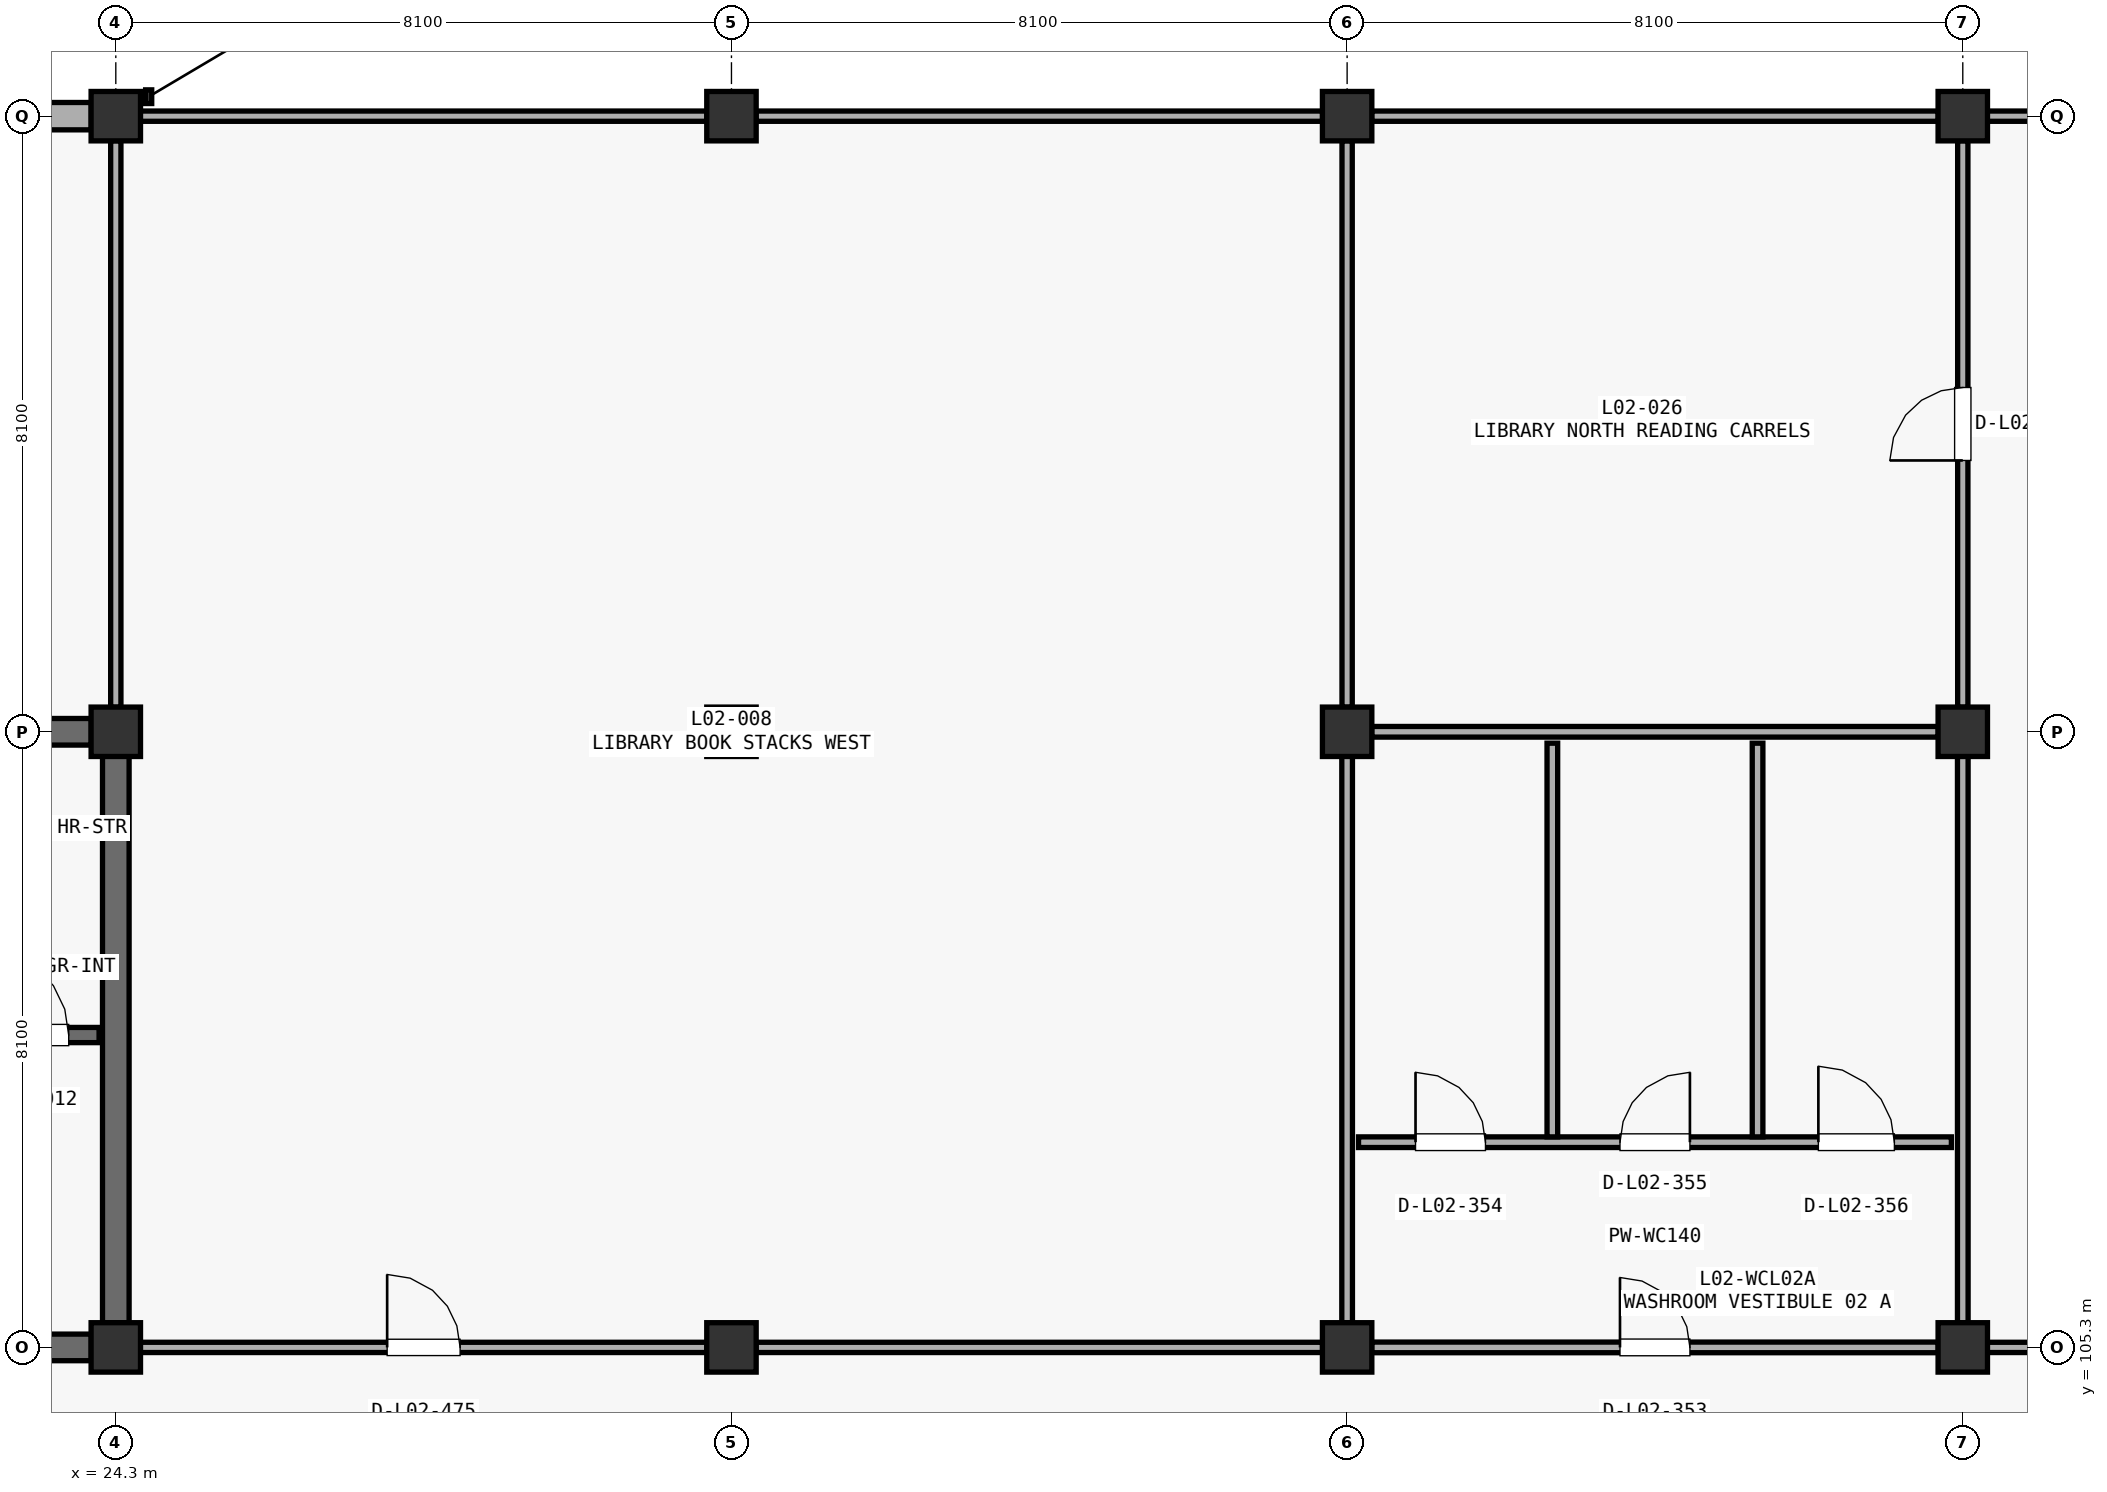
"""IFC4 building model, lengths in metres.
Left out: names, types, materials, properties, quantities, classifications, styles, units other than length and angle.
Written with IfcOpenShell. Run it as: python <this file> out.ifc"""

import sys

from ifc_helpers import new_model, si_unit, direction, frame, frame_2d, origin, origin_2d, place, context, subcontext, project, spatial, rectangle, extrude, element, fill, save


model = new_model("IFC4")
c1 = context("Model", 3, precision=1e-05, world=origin(), true_north=direction((0.0, 1.0)))
c2 = subcontext(c1, "Body", "Model", "MODEL_VIEW")
j1 = project(units=[si_unit("LENGTHUNIT", "METRE"), si_unit("PLANEANGLEUNIT", "RADIAN")], contexts=[c1])
p1 = place(None, origin())
s1 = spatial("IfcSite", under=j1, at=p1, CompositionType="ELEMENT")
p2 = place(p1, origin())
s2 = spatial("IfcBuilding", under=s1, at=p2, CompositionType="ELEMENT")
p3 = place(p2, frame((0.0, 0.0, 9.69)))
s3 = spatial("IfcBuildingStorey", under=s2, at=p3, CompositionType="ELEMENT", Elevation=9.69)
for number, where, z_axis, x_axis in (
    (1, (24.3, 105.3, 0.0), (0.0, 0.0, 1.0), (1.0, 0.0, 0.0)),
    (2, (24.3, 113.4, 0.0), (0.0, 0.0, 1.0), (1.0, 0.0, 0.0)),
    (3, (24.3, 121.5, 0.0), (0.0, 0.0, 1.0), (1.0, 0.0, 0.0)),
    (4, (32.4, 105.3, 0.0), (0.0, 0.0, 1.0), (1.0, 0.0, 0.0)),
    (5, (32.4, 113.4, 0.0), (0.0, 0.0, 1.0), (1.0, 0.0, 0.0)),
    (6, (32.4, 121.5, 0.0), (0.0, 0.0, 1.0), (1.0, 0.0, 0.0)),
    (7, (40.5, 105.3, 0.0), (0.0, 0.0, 1.0), (1.0, 0.0, 0.0)),
    (8, (40.5, 113.4, 0.0), (0.0, 0.0, 1.0), (1.0, 0.0, 0.0)),
    (9, (40.5, 121.5, 0.0), (0.0, 0.0, 1.0), (1.0, 0.0, 0.0)),
    (10, (48.6, 105.3, 0.0), (0.0, 0.0, 1.0), (1.0, 0.0, 0.0)),
    (11, (48.6, 113.4, 0.0), (0.0, 0.0, 1.0), (1.0, 0.0, 0.0)),
    (12, (48.6, 121.5, 0.0), (0.0, 0.0, 1.0), (1.0, 0.0, 0.0)),
):
    element("IfcColumn", number, at=place(p3, frame(where, z_axis=z_axis, x_axis=x_axis)), inside=s3, PredefinedType="COLUMN", context=c2, shape_type="SweptSolid", body=[
        extrude(rectangle(XDim=0.65, YDim=0.65, at=origin_2d()), origin(), (0.0, 0.0, 1.0), 4.42),
    ])
p4 = place(p3, frame((16.523, 121.5, 0.0), z_axis=(0.0, 0.0, 1.0), x_axis=(1.0, 0.0, 0.0)))
e13 = element("IfcWall", 13, at=p4, inside=s3, PredefinedType="STANDARD", context=c2, shape_type="SweptSolid", body=[
    extrude(rectangle(XDim=7.454, YDim=0.36, at=frame_2d((3.727, 0.0))), origin(), (0.0, 0.0, 1.0), 3.332),
])
p5 = place(p4, frame((2.877, 0.0, 0.85)))
e14 = element("IfcOpeningElement", 14, at=p5, cuts=e13, PredefinedType="OPENING", context=c2, shape_type="SweptSolid", body=[
    extrude(rectangle(XDim=1.7, YDim=1.7, at=frame_2d((0.85, 0.85))), frame((0.0, 0.19, 0.0), z_axis=(0.0, -1.0, 0.0), x_axis=(1.0, 0.0, 0.0)), (0.0, 0.0, 1.0), 0.38),
])
p6 = place(p3, frame((16.523, 113.4, 0.0), z_axis=(0.0, 0.0, 1.0), x_axis=(1.0, 0.0, 0.0)))
e15 = element("IfcWall", 15, at=p6, inside=s3, PredefinedType="SHEAR", context=c2, shape_type="SweptSolid", body=[
    extrude(rectangle(XDim=7.454, YDim=0.35, at=frame_2d((3.727, 0.0))), origin(), (0.0, 0.0, 1.0), 4.082),
])
p7 = place(p3, frame((24.3, 105.623, 0.0), z_axis=(0.0, 0.0, 1.0), x_axis=(0.0, 1.0, 0.0)))
e16 = element("IfcWall", 16, at=p7, inside=s3, PredefinedType="SHEAR", context=c2, shape_type="SweptSolid", body=[
    extrude(rectangle(XDim=7.454, YDim=0.35, at=frame_2d((3.727, 0.0))), origin(), (0.0, 0.0, 1.0), 4.082),
])
p8 = place(p3, frame((16.523, 105.3, 0.0), z_axis=(0.0, 0.0, 1.0), x_axis=(1.0, 0.0, 0.0)))
e17 = element("IfcWall", 17, at=p8, inside=s3, PredefinedType="SHEAR", context=c2, shape_type="SweptSolid", body=[
    extrude(rectangle(XDim=7.454, YDim=0.35, at=frame_2d((3.727, 0.0))), origin(), (0.0, 0.0, 1.0), 4.082),
])
p9 = place(p8, frame((5.204, 0.0, 0.0)))
e18 = element("IfcOpeningElement", 18, at=p9, cuts=e17, PredefinedType="OPENING", context=c2, shape_type="SweptSolid", body=[
    extrude(rectangle(XDim=1.2, YDim=2.2, at=frame_2d((0.6, 1.1))), frame((0.0, 0.185, 0.0), z_axis=(0.0, -1.0, 0.0), x_axis=(1.0, 0.0, 0.0)), (0.0, 0.0, 1.0), 0.37),
])
p10 = place(p3, frame((16.42, 109.41, 0.0), z_axis=(0.0, 0.0, 1.0), x_axis=(1.0, 0.0, 0.0)))
e19 = element("IfcWall", 19, at=p10, inside=s3, PredefinedType="SHEAR", context=c2, shape_type="SweptSolid", body=[
    extrude(rectangle(XDim=7.66, YDim=0.2, at=frame_2d((3.83, 0.0))), origin(), (0.0, 0.0, 1.0), 4.082),
])
p11 = place(p10, frame((6.11, 0.0, 0.0)))
e20 = element("IfcOpeningElement", 20, at=p11, cuts=e19, PredefinedType="OPENING", context=c2, shape_type="SweptSolid", body=[
    extrude(rectangle(XDim=1.15, YDim=2.2, at=frame_2d((0.575, 1.1))), frame((0.0, 0.11, 0.0), z_axis=(0.0, -1.0, 0.0), x_axis=(1.0, 0.0, 0.0)), (0.0, 0.0, 1.0), 0.22),
])
p12 = place(p3, frame((40.823, 105.3, 0.0), z_axis=(0.0, 0.0, 1.0), x_axis=(1.0, 0.0, 0.0)))
e21 = element("IfcWall", 21, at=p12, inside=s3, PredefinedType="PARTITIONING", context=c2, shape_type="SweptSolid", body=[
    extrude(rectangle(XDim=7.454, YDim=0.14, at=frame_2d((3.727, 0.0))), origin(), (0.0, 0.0, 1.0), 3.43),
])
p13 = place(p12, frame((3.267, 0.0, 0.0)))
e22 = element("IfcOpeningElement", 22, at=p13, cuts=e21, PredefinedType="OPENING", context=c2, shape_type="SweptSolid", body=[
    extrude(rectangle(XDim=0.92, YDim=2.15, at=frame_2d((0.46, 1.075))), frame((0.0, 0.08, 0.0), z_axis=(0.0, -1.0, 0.0), x_axis=(1.0, 0.0, 0.0)), (0.0, 0.0, 1.0), 0.16),
])
p14 = place(p3, frame((40.823, 113.4, 0.0), z_axis=(0.0, 0.0, 1.0), x_axis=(1.0, 0.0, 0.0)))
e23 = element("IfcWall", 23, at=p14, inside=s3, PredefinedType="PARTITIONING", context=c2, shape_type="SweptSolid", body=[
    extrude(rectangle(XDim=7.454, YDim=0.14, at=frame_2d((3.727, 0.0))), origin(), (0.0, 0.0, 1.0), 3.48),
])
p15 = place(p3, frame((40.5, 105.623, 0.0), z_axis=(0.0, 0.0, 1.0), x_axis=(0.0, 1.0, 0.0)))
e24 = element("IfcWall", 24, at=p15, inside=s3, PredefinedType="PARTITIONING", context=c2, shape_type="SweptSolid", body=[
    extrude(rectangle(XDim=7.454, YDim=0.14, at=frame_2d((3.727, 0.0))), origin(), (0.0, 0.0, 1.0), 3.43),
])
p16 = place(p3, frame((48.6, 105.623, 0.0), z_axis=(0.0, 0.0, 1.0), x_axis=(0.0, 1.0, 0.0)))
e25 = element("IfcWall", 25, at=p16, inside=s3, PredefinedType="PARTITIONING", context=c2, shape_type="SweptSolid", body=[
    extrude(rectangle(XDim=7.454, YDim=0.14, at=frame_2d((3.727, 0.0))), origin(), (0.0, 0.0, 1.0), 3.23),
])
p17 = place(p3, frame((40.65, 108.0, 0.0), z_axis=(0.0, 0.0, 1.0), x_axis=(1.0, 0.0, 0.0)))
e26 = element("IfcWall", 26, at=p17, inside=s3, PredefinedType="PARTITIONING", context=c2, shape_type="SweptSolid", body=[
    extrude(rectangle(XDim=7.8, YDim=0.14, at=frame_2d((3.9, 0.0))), origin(), (0.0, 0.0, 1.0), 4.082),
])
p18 = place(p17, frame((0.75, 0.0, 0.0)))
e27 = element("IfcOpeningElement", 27, at=p18, cuts=e26, PredefinedType="OPENING", context=c2, shape_type="SweptSolid", body=[
    extrude(rectangle(XDim=0.92, YDim=2.15, at=frame_2d((0.46, 1.075))), frame((0.0, 0.08, 0.0), z_axis=(0.0, -1.0, 0.0), x_axis=(1.0, 0.0, 0.0)), (0.0, 0.0, 1.0), 0.16),
])
p19 = place(p17, frame((3.44, 0.0, 0.0)))
e28 = element("IfcOpeningElement", 28, at=p19, cuts=e26, PredefinedType="OPENING", context=c2, shape_type="SweptSolid", body=[
    extrude(rectangle(XDim=0.92, YDim=2.15, at=frame_2d((0.46, 1.075))), frame((0.0, 0.08, 0.0), z_axis=(0.0, -1.0, 0.0), x_axis=(1.0, 0.0, 0.0)), (0.0, 0.0, 1.0), 0.16),
])
p20 = place(p17, frame((6.05, 0.0, 0.0)))
e29 = element("IfcOpeningElement", 29, at=p20, cuts=e26, PredefinedType="OPENING", context=c2, shape_type="SweptSolid", body=[
    extrude(rectangle(XDim=1.0, YDim=2.15, at=frame_2d((0.5, 1.075))), frame((0.0, 0.08, 0.0), z_axis=(0.0, -1.0, 0.0), x_axis=(1.0, 0.0, 0.0)), (0.0, 0.0, 1.0), 0.16),
])
for number, where, z_axis, x_axis in (
    (30, (43.2, 108.07, 0.0), (0.0, 0.0, 1.0), (0.0, 1.0, 0.0)),
    (31, (45.9, 108.07, 0.0), (0.0, 0.0, 1.0), (0.0, 1.0, 0.0)),
):
    element("IfcWall", number, at=place(p3, frame(where, z_axis=z_axis, x_axis=x_axis)), inside=s3, PredefinedType="PARTITIONING", context=c2, shape_type="SweptSolid", body=[
        extrude(rectangle(XDim=5.18, YDim=0.14, at=frame_2d((2.59, 0.0))), origin(), (0.0, 0.0, 1.0), 4.082),
    ])
p21 = place(p3, frame((24.623, 105.3, 0.0), z_axis=(0.0, 0.0, 1.0), x_axis=(1.0, 0.0, 0.0)))
e32 = element("IfcWall", 32, at=p21, inside=s3, PredefinedType="PARTITIONING", context=c2, shape_type="SweptSolid", body=[
    extrude(rectangle(XDim=7.454, YDim=0.135, at=frame_2d((3.727, 0.0))), origin(), (0.0, 0.0, 1.0), 3.132),
])
p22 = place(p21, frame((3.247, 0.0, 0.0)))
e33 = element("IfcOpeningElement", 33, at=p22, cuts=e32, PredefinedType="OPENING", context=c2, shape_type="SweptSolid", body=[
    extrude(rectangle(XDim=0.96, YDim=2.15, at=frame_2d((0.48, 1.075))), frame((0.0, 0.078, 0.0), z_axis=(0.0, -1.0, 0.0), x_axis=(1.0, 0.0, 0.0)), (0.0, 0.0, 1.0), 0.155),
])
p23 = place(p3, frame((32.723, 105.3, 0.0), z_axis=(0.0, 0.0, 1.0), x_axis=(1.0, 0.0, 0.0)))
e34 = element("IfcWall", 34, at=p23, inside=s3, PredefinedType="PARTITIONING", context=c2, shape_type="SweptSolid", body=[
    extrude(rectangle(XDim=7.454, YDim=0.135, at=frame_2d((3.727, 0.0))), origin(), (0.0, 0.0, 1.0), 3.332),
])
p24 = place(p3, frame((40.5, 113.723, 0.0), z_axis=(0.0, 0.0, 1.0), x_axis=(0.0, 1.0, 0.0)))
e35 = element("IfcWall", 35, at=p24, inside=s3, PredefinedType="PARTITIONING", context=c2, shape_type="SweptSolid", body=[
    extrude(rectangle(XDim=7.454, YDim=0.135, at=frame_2d((3.727, 0.0))), origin(), (0.0, 0.0, 1.0), 3.482),
])
p25 = place(p3, frame((24.3, 113.723, 0.0), z_axis=(0.0, 0.0, 1.0), x_axis=(0.0, 1.0, 0.0)))
e36 = element("IfcWall", 36, at=p25, inside=s3, PredefinedType="PARTITIONING", context=c2, shape_type="SweptSolid", body=[
    extrude(rectangle(XDim=7.454, YDim=0.135, at=frame_2d((3.727, 0.0))), origin(), (0.0, 0.0, 1.0), 3.232),
])
p26 = place(p3, frame((24.623, 121.5, 0.0), z_axis=(0.0, 0.0, 1.0), x_axis=(1.0, 0.0, 0.0)))
e37 = element("IfcWall", 37, at=p26, inside=s3, PredefinedType="PARTITIONING", context=c2, shape_type="SweptSolid", body=[
    extrude(rectangle(XDim=7.454, YDim=0.135, at=frame_2d((3.727, 0.0))), origin(), (0.0, 0.0, 1.0), 3.667),
])
p27 = place(p3, frame((32.723, 121.5, 0.0), z_axis=(0.0, 0.0, 1.0), x_axis=(1.0, 0.0, 0.0)))
e38 = element("IfcWall", 38, at=p27, inside=s3, PredefinedType="PARTITIONING", context=c2, shape_type="SweptSolid", body=[
    extrude(rectangle(XDim=7.454, YDim=0.135, at=frame_2d((3.727, 0.0))), origin(), (0.0, 0.0, 1.0), 3.482),
])
p28 = place(p3, frame((48.923, 105.3, 0.0), z_axis=(0.0, 0.0, 1.0), x_axis=(1.0, 0.0, 0.0)))
e39 = element("IfcWall", 39, at=p28, inside=s3, PredefinedType="PARTITIONING", context=c2, shape_type="SweptSolid", body=[
    extrude(rectangle(XDim=7.454, YDim=0.135, at=frame_2d((3.727, 0.0))), origin(), (0.0, 0.0, 1.0), 3.482),
])
p29 = place(p28, frame((3.247, 0.0, 0.0)))
e40 = element("IfcOpeningElement", 40, at=p29, cuts=e39, PredefinedType="OPENING", context=c2, shape_type="SweptSolid", body=[
    extrude(rectangle(XDim=0.96, YDim=2.15, at=frame_2d((0.48, 1.075))), frame((0.0, 0.078, 0.0), z_axis=(0.0, -1.0, 0.0), x_axis=(1.0, 0.0, 0.0)), (0.0, 0.0, 1.0), 0.155),
])
p30 = place(p3, frame((48.6, 113.723, 0.0), z_axis=(0.0, 0.0, 1.0), x_axis=(0.0, 1.0, 0.0)))
e41 = element("IfcWall", 41, at=p30, inside=s3, PredefinedType="PARTITIONING", context=c2, shape_type="SweptSolid", body=[
    extrude(rectangle(XDim=7.454, YDim=0.135, at=frame_2d((3.727, 0.0))), origin(), (0.0, 0.0, 1.0), 3.132),
])
p31 = place(p30, frame((3.247, 0.0, 0.0)))
e42 = element("IfcOpeningElement", 42, at=p31, cuts=e41, PredefinedType="OPENING", context=c2, shape_type="SweptSolid", body=[
    extrude(rectangle(XDim=0.96, YDim=2.15, at=frame_2d((0.48, 1.075))), frame((0.0, 0.078, 0.0), z_axis=(0.0, -1.0, 0.0), x_axis=(1.0, 0.0, 0.0)), (0.0, 0.0, 1.0), 0.155),
])
p32 = place(p3, frame((48.923, 121.5, 0.0), z_axis=(0.0, 0.0, 1.0), x_axis=(1.0, 0.0, 0.0)))
e43 = element("IfcWall", 43, at=p32, inside=s3, PredefinedType="PARTITIONING", context=c2, shape_type="SweptSolid", body=[
    extrude(rectangle(XDim=7.454, YDim=0.135, at=frame_2d((3.727, 0.0))), origin(), (0.0, 0.0, 1.0), 3.667),
])
p33 = place(p3, frame((40.823, 121.5, 0.0), z_axis=(0.0, 0.0, 1.0), x_axis=(1.0, 0.0, 0.0)))
e44 = element("IfcWall", 44, at=p33, inside=s3, PredefinedType="PARTITIONING", context=c2, shape_type="SweptSolid", body=[
    extrude(rectangle(XDim=7.454, YDim=0.135, at=frame_2d((3.727, 0.0))), origin(), (0.0, 0.0, 1.0), 3.232),
])
p34 = place(p11, origin())
e45 = element("IfcDoor", 45, at=p34, inside=s3, OperationType="SINGLE_SWING_LEFT", PredefinedType="DOOR", context=c2, shape_type="SweptSolid", body=[
    extrude(rectangle(XDim=1.15, YDim=2.2, at=frame_2d((0.575, 1.1))), frame((0.0, 0.025, 0.0), z_axis=(0.0, -1.0, 0.0), x_axis=(1.0, 0.0, 0.0)), (0.0, 0.0, 1.0), 0.05),
])
fill(e20, e45)
p35 = place(p13, origin())
e46 = element("IfcDoor", 46, at=p35, inside=s3, OperationType="SINGLE_SWING_LEFT", PredefinedType="DOOR", context=c2, shape_type="SweptSolid", body=[
    extrude(rectangle(XDim=0.92, YDim=2.15, at=frame_2d((0.46, 1.075))), frame((0.0, 0.025, 0.0), z_axis=(0.0, -1.0, 0.0), x_axis=(1.0, 0.0, 0.0)), (0.0, 0.0, 1.0), 0.05),
])
fill(e22, e46)
p36 = place(p18, origin())
e47 = element("IfcDoor", 47, at=p36, inside=s3, OperationType="SINGLE_SWING_LEFT", PredefinedType="DOOR", context=c2, shape_type="SweptSolid", body=[
    extrude(rectangle(XDim=0.92, YDim=2.15, at=frame_2d((0.46, 1.075))), frame((0.0, 0.025, 0.0), z_axis=(0.0, -1.0, 0.0), x_axis=(1.0, 0.0, 0.0)), (0.0, 0.0, 1.0), 0.05),
])
fill(e27, e47)
p37 = place(p19, origin())
e48 = element("IfcDoor", 48, at=p37, inside=s3, OperationType="SINGLE_SWING_RIGHT", PredefinedType="DOOR", context=c2, shape_type="SweptSolid", body=[
    extrude(rectangle(XDim=0.92, YDim=2.15, at=frame_2d((0.46, 1.075))), frame((0.0, 0.025, 0.0), z_axis=(0.0, -1.0, 0.0), x_axis=(1.0, 0.0, 0.0)), (0.0, 0.0, 1.0), 0.05),
])
fill(e28, e48)
p38 = place(p20, origin())
e49 = element("IfcDoor", 49, at=p38, inside=s3, OperationType="SINGLE_SWING_LEFT", PredefinedType="DOOR", context=c2, shape_type="SweptSolid", body=[
    extrude(rectangle(XDim=1.0, YDim=2.15, at=frame_2d((0.5, 1.075))), frame((0.0, 0.025, 0.0), z_axis=(0.0, -1.0, 0.0), x_axis=(1.0, 0.0, 0.0)), (0.0, 0.0, 1.0), 0.05),
])
fill(e29, e49)
p39 = place(p22, origin())
e50 = element("IfcDoor", 50, at=p39, inside=s3, OperationType="SINGLE_SWING_LEFT", PredefinedType="DOOR", context=c2, shape_type="SweptSolid", body=[
    extrude(rectangle(XDim=0.96, YDim=2.15, at=frame_2d((0.48, 1.075))), frame((0.0, 0.025, 0.0), z_axis=(0.0, -1.0, 0.0), x_axis=(1.0, 0.0, 0.0)), (0.0, 0.0, 1.0), 0.05),
])
fill(e33, e50)
p40 = place(p31, origin())
e51 = element("IfcDoor", 51, at=p40, inside=s3, OperationType="SINGLE_SWING_LEFT", PredefinedType="DOOR", context=c2, shape_type="SweptSolid", body=[
    extrude(rectangle(XDim=0.96, YDim=2.15, at=frame_2d((0.48, 1.075))), frame((0.0, 0.025, 0.0), z_axis=(0.0, -1.0, 0.0), x_axis=(1.0, 0.0, 0.0)), (0.0, 0.0, 1.0), 0.05),
])
fill(e42, e51)
save(model, sys.argv[1])
